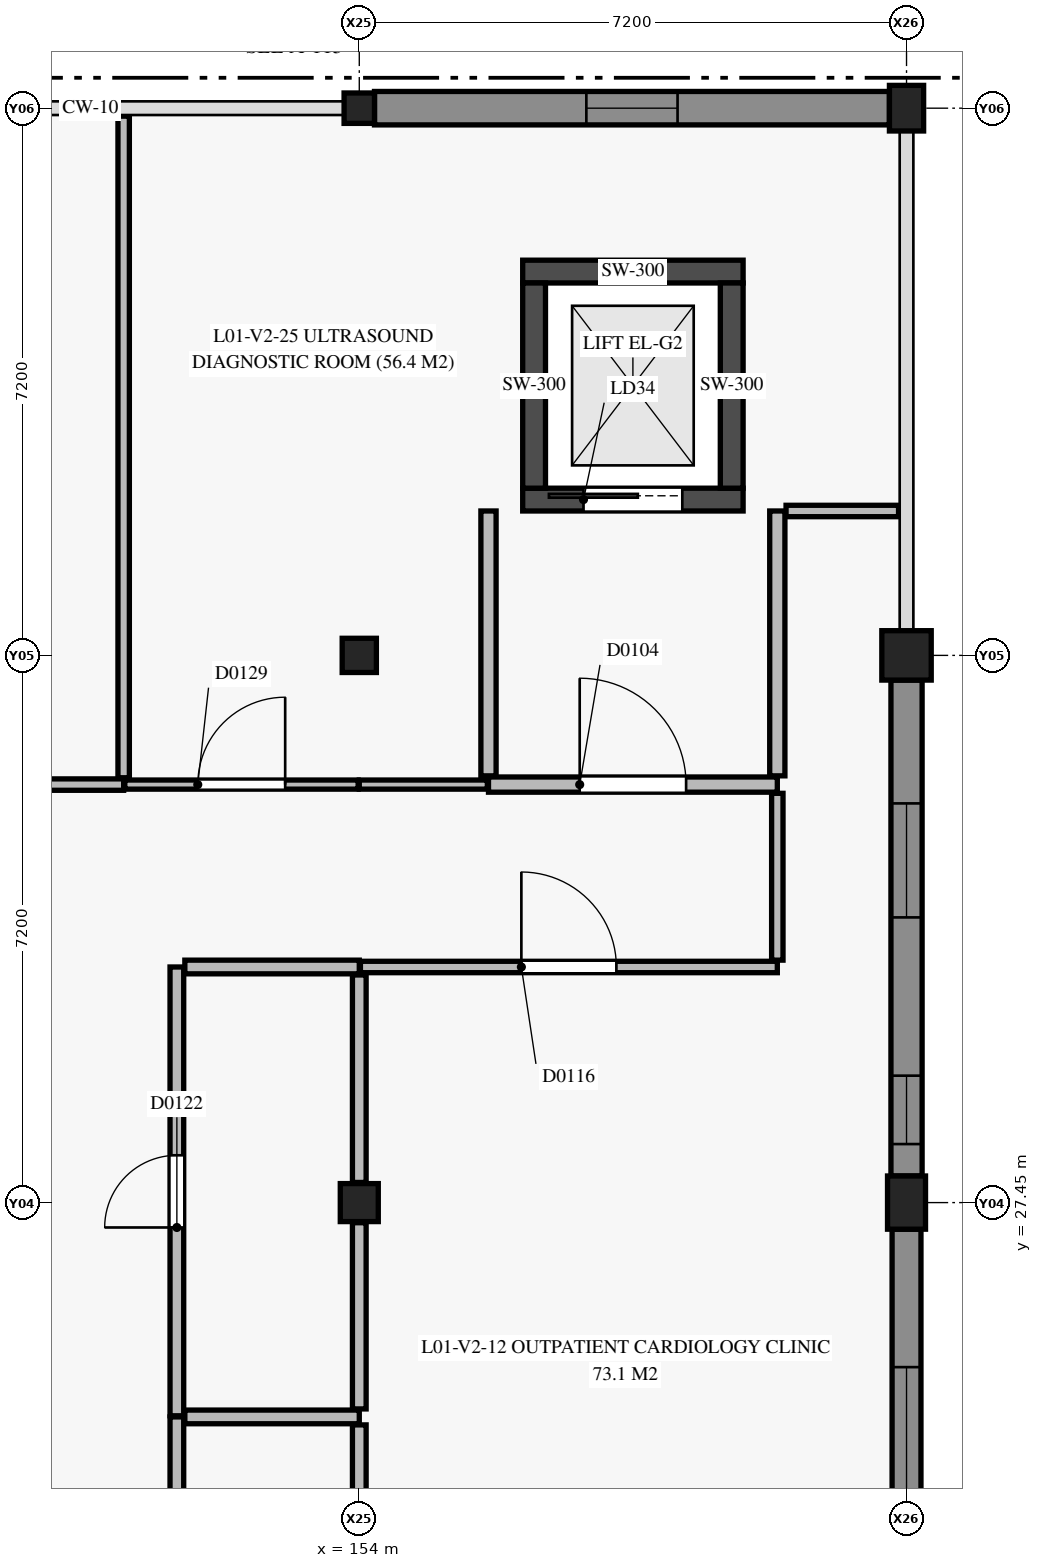
"""IFC4 building model, lengths in metres.
Left out: names, types, materials, properties, quantities, classifications, styles, units other than length and angle.
Written with IfcOpenShell. Run it as: python <this file> out.ifc"""

import sys

from ifc_helpers import new_model, si_unit, direction, frame, frame_2d, origin, origin_2d, place, context, subcontext, project, spatial, rectangle, circle, extrude, element, fill, save


model = new_model("IFC4")
c1 = context("Model", 3, precision=1e-05, world=origin(), true_north=direction((0.0, 1.0)))
c2 = subcontext(c1, "Body", "Model", "MODEL_VIEW")
j1 = project(units=[si_unit("LENGTHUNIT", "METRE"), si_unit("PLANEANGLEUNIT", "RADIAN")], contexts=[c1])
p1 = place(None, origin())
s1 = spatial("IfcSite", under=j1, at=p1, CompositionType="ELEMENT")
p2 = place(p1, origin())
s2 = spatial("IfcBuilding", under=s1, at=p2, CompositionType="ELEMENT")
p3 = place(p2, frame((0.0, 0.0, 4.8)))
s3 = spatial("IfcBuildingStorey", under=s2, at=p3, CompositionType="ELEMENT", Elevation=4.8)
p4 = place(p3, frame((154.0, 27.45, 0.0), z_axis=(0.0, 0.0, 1.0), x_axis=(1.0, 0.0, 0.0)))
e1 = element("IfcColumn", 1, at=p4, inside=s3, PredefinedType="COLUMN", context=c2, shape_type="SweptSolid", body=[
    extrude(rectangle(XDim=0.5, YDim=0.5, at=origin_2d()), origin(), (0.0, 0.0, 1.0), 4.05),
])
p5 = place(p3, frame((154.0, 34.65, 0.0), z_axis=(0.0, 0.0, 1.0), x_axis=(1.0, 0.0, 0.0)))
e2 = element("IfcColumn", 2, at=p5, inside=s3, PredefinedType="COLUMN", context=c2, shape_type="SweptSolid", body=[
    extrude(rectangle(XDim=0.45, YDim=0.45, at=origin_2d()), origin(), (0.0, 0.0, 1.0), 4.05),
])
p6 = place(p3, frame((154.0, 41.85, 0.0), z_axis=(0.0, 0.0, 1.0), x_axis=(1.0, 0.0, 0.0)))
e3 = element("IfcColumn", 3, at=p6, inside=s3, PredefinedType="COLUMN", context=c2, shape_type="SweptSolid", body=[
    extrude(rectangle(XDim=0.4, YDim=0.4, at=origin_2d()), origin(), (0.0, 0.0, 1.0), 4.36),
])
p7 = place(p3, frame((161.2, 27.45, 0.0), z_axis=(0.0, 0.0, 1.0), x_axis=(1.0, 0.0, 0.0)))
e4 = element("IfcColumn", 4, at=p7, inside=s3, PredefinedType="COLUMN", context=c2, shape_type="SweptSolid", body=[
    extrude(rectangle(XDim=0.5, YDim=0.7, at=origin_2d()), origin(), (0.0, 0.0, 1.0), 4.05),
])
p8 = place(p3, frame((161.2, 34.65, 0.0), z_axis=(0.0, 0.0, 1.0), x_axis=(1.0, 0.0, 0.0)))
e5 = element("IfcColumn", 5, at=p8, inside=s3, PredefinedType="COLUMN", context=c2, shape_type="SweptSolid", body=[
    extrude(circle(Radius=0.325, at=origin_2d()), origin(), (0.0, 0.0, 1.0), 4.05),
])
p9 = place(p3, frame((161.2, 41.85, 0.0), z_axis=(0.0, 0.0, 1.0), x_axis=(1.0, 0.0, 0.0)))
e6 = element("IfcColumn", 6, at=p9, inside=s3, PredefinedType="COLUMN", context=c2, shape_type="SweptSolid", body=[
    extrude(rectangle(XDim=0.45, YDim=0.6, at=origin_2d()), origin(), (0.0, 0.0, 1.0), 4.36),
])
p10 = place(p3, frame((156.15, 36.7, 0.0), z_axis=(0.0, 0.0, 1.0), x_axis=(1.0, 0.0, 0.0)))
e7 = element("IfcWall", 7, at=p10, inside=s3, PredefinedType="SHEAR", context=c2, shape_type="SweptSolid", body=[
    extrude(rectangle(XDim=2.9, YDim=0.3, at=frame_2d((1.45, 0.0))), origin(), (0.0, 0.0, 1.0), 3.95),
])
p11 = place(p10, frame((0.8, 0.0, 0.0)))
e8 = element("IfcOpeningElement", 8, at=p11, cuts=e7, PredefinedType="OPENING", context=c2, shape_type="SweptSolid", body=[
    extrude(rectangle(XDim=1.3, YDim=2.15, at=frame_2d((0.65, 1.075))), frame((0.0, 0.16, 0.0), z_axis=(0.0, -1.0, 0.0), x_axis=(1.0, 0.0, 0.0)), (0.0, 0.0, 1.0), 0.32),
])
p12 = place(p3, frame((156.15, 39.7, 0.0), z_axis=(0.0, 0.0, 1.0), x_axis=(1.0, 0.0, 0.0)))
e9 = element("IfcWall", 9, at=p12, inside=s3, PredefinedType="SHEAR", context=c2, shape_type="SweptSolid", body=[
    extrude(rectangle(XDim=2.9, YDim=0.3, at=frame_2d((1.45, 0.0))), origin(), (0.0, 0.0, 1.0), 3.95),
])
for number, where, z_axis, x_axis in (
    (10, (156.3, 36.85, 0.0), (0.0, 0.0, 1.0), (0.0, 1.0, 0.0)),
    (11, (158.9, 36.85, 0.0), (0.0, 0.0, 1.0), (0.0, 1.0, 0.0)),
):
    element("IfcWall", number, at=place(p3, frame(where, z_axis=z_axis, x_axis=x_axis)), inside=s3, PredefinedType="SHEAR", context=c2, shape_type="SweptSolid", body=[
        extrude(rectangle(XDim=2.7, YDim=0.3, at=frame_2d((1.35, 0.0))), origin(), (0.0, 0.0, 1.0), 3.95),
    ])
p13 = place(p3, frame((154.2, 41.85, 0.0), z_axis=(0.0, 0.0, 1.0), x_axis=(1.0, 0.0, 0.0)))
e12 = element("IfcWall", 12, at=p13, inside=s3, PredefinedType="USERDEFINED", context=c2, shape_type="SweptSolid", body=[
    extrude(rectangle(XDim=6.775, YDim=0.44, at=frame_2d((3.388, 0.0))), origin(), (0.0, 0.0, 1.0), 3.38),
])
p14 = place(p13, frame((2.788, 0.0, 0.9)))
e13 = element("IfcOpeningElement", 13, at=p14, cuts=e12, PredefinedType="OPENING", context=c2, shape_type="SweptSolid", body=[
    extrude(rectangle(XDim=1.2, YDim=1.5, at=frame_2d((0.6, 0.75))), frame((0.0, 0.23, 0.0), z_axis=(0.0, -1.0, 0.0), x_axis=(1.0, 0.0, 0.0)), (0.0, 0.0, 1.0), 0.46),
])
p15 = place(p3, frame((161.2, 34.325, 0.0), z_axis=(0.0, 0.0, 1.0), x_axis=(0.0, -1.0, 0.0)))
e14 = element("IfcWall", 14, at=p15, inside=s3, PredefinedType="USERDEFINED", context=c2, shape_type="SweptSolid", body=[
    extrude(rectangle(XDim=6.525, YDim=0.41, at=frame_2d((3.262, 0.0))), origin(), (0.0, 0.0, 1.0), 3.38),
])
p16 = place(p15, frame((1.623, 0.0, 0.9)))
e15 = element("IfcOpeningElement", 15, at=p16, cuts=e14, PredefinedType="OPENING", context=c2, shape_type="SweptSolid", body=[
    extrude(rectangle(XDim=1.5, YDim=1.5, at=frame_2d((0.75, 0.75))), frame((0.0, 0.215, 0.0), z_axis=(0.0, -1.0, 0.0), x_axis=(1.0, 0.0, 0.0)), (0.0, 0.0, 1.0), 0.43),
])
p17 = place(p15, frame((5.205, 0.0, 0.95)))
e16 = element("IfcOpeningElement", 16, at=p17, cuts=e14, PredefinedType="OPENING", context=c2, shape_type="SweptSolid", body=[
    extrude(rectangle(XDim=0.9, YDim=1.2, at=frame_2d((0.45, 0.6))), frame((0.0, 0.215, 0.0), z_axis=(0.0, -1.0, 0.0), x_axis=(1.0, 0.0, 0.0)), (0.0, 0.0, 1.0), 0.43),
])
p18 = place(p3, frame((161.2, 27.1, 0.0), z_axis=(0.0, 0.0, 1.0), x_axis=(0.0, -1.0, 0.0)))
e17 = element("IfcWall", 17, at=p18, inside=s3, PredefinedType="USERDEFINED", context=c2, shape_type="SweptSolid", body=[
    extrude(rectangle(XDim=6.4, YDim=0.38, at=frame_2d((3.2, 0.0))), origin(), (0.0, 0.0, 1.0), 3.38),
])
p19 = place(p18, frame((1.815, 0.0, 0.9)))
e18 = element("IfcOpeningElement", 18, at=p19, cuts=e17, PredefinedType="OPENING", context=c2, shape_type="SweptSolid", body=[
    extrude(rectangle(XDim=2.4, YDim=1.5, at=frame_2d((1.2, 0.75))), frame((0.0, 0.2, 0.0), z_axis=(0.0, -1.0, 0.0), x_axis=(1.0, 0.0, 0.0)), (0.0, 0.0, 1.0), 0.4),
])
p20 = place(p3, frame((155.7, 32.95, 0.0), z_axis=(0.0, 0.0, 1.0), x_axis=(1.0, 0.0, 0.0)))
e19 = element("IfcWall", 19, at=p20, inside=s3, PredefinedType="PARTITIONING", context=c2, shape_type="SweptSolid", body=[
    extrude(rectangle(XDim=3.8, YDim=0.2, at=frame_2d((1.9, 0.0))), origin(), (0.0, 0.0, 1.0), 3.95),
])
p21 = place(p20, frame((1.2, 0.0, 0.0)))
e20 = element("IfcOpeningElement", 20, at=p21, cuts=e19, PredefinedType="OPENING", context=c2, shape_type="SweptSolid", body=[
    extrude(rectangle(XDim=1.4, YDim=2.2, at=frame_2d((0.7, 1.1))), frame((0.0, 0.11, 0.0), z_axis=(0.0, -1.0, 0.0), x_axis=(1.0, 0.0, 0.0)), (0.0, 0.0, 1.0), 0.22),
])
for number, where, z_axis, x_axis in (
    (21, (159.5, 33.065, 0.0), (0.0, 0.0, 1.0), (0.0, 1.0, 0.0)),
    (22, (155.7, 33.065, 0.0), (0.0, 0.0, 1.0), (0.0, 1.0, 0.0)),
):
    element("IfcWall", number, at=place(p3, frame(where, z_axis=z_axis, x_axis=x_axis)), inside=s3, PredefinedType="PARTITIONING", context=c2, shape_type="SweptSolid", body=[
        extrude(rectangle(XDim=3.485, YDim=0.2, at=frame_2d((1.743, 0.0))), origin(), (0.0, 0.0, 1.0), 3.47),
    ])
p22 = place(p3, frame((151.6, 18.115, 0.0), z_axis=(0.0, 0.0, 1.0), x_axis=(0.0, 1.0, 0.0)))
e23 = element("IfcWall", 23, at=p22, inside=s3, PredefinedType="PLUMBINGWALL", context=c2, shape_type="SweptSolid", body=[
    extrude(rectangle(XDim=6.515, YDim=0.18, at=frame_2d((3.257, 0.0))), origin(), (0.0, 0.0, 1.0), 3.37),
])
p23 = place(p22, frame((2.782, 0.0, 0.0)))
e24 = element("IfcOpeningElement", 24, at=p23, cuts=e23, PredefinedType="OPENING", context=c2, shape_type="SweptSolid", body=[
    extrude(rectangle(XDim=0.95, YDim=2.1, at=frame_2d((0.475, 1.05))), frame((0.0, 0.1, 0.0), z_axis=(0.0, -1.0, 0.0), x_axis=(1.0, 0.0, 0.0)), (0.0, 0.0, 1.0), 0.2),
])
p24 = place(p3, frame((151.6, 24.645, 0.0), z_axis=(0.0, 0.0, 1.0), x_axis=(0.0, 1.0, 0.0)))
e25 = element("IfcWall", 25, at=p24, inside=s3, PredefinedType="PLUMBINGWALL", context=c2, shape_type="SweptSolid", body=[
    extrude(rectangle(XDim=5.905, YDim=0.18, at=frame_2d((2.953, 0.0))), origin(), (0.0, 0.0, 1.0), 3.22),
])
p25 = place(p24, frame((2.478, 0.0, 0.0)))
e26 = element("IfcOpeningElement", 26, at=p25, cuts=e25, PredefinedType="OPENING", context=c2, shape_type="SweptSolid", body=[
    extrude(rectangle(XDim=0.95, YDim=2.1, at=frame_2d((0.475, 1.05))), frame((0.0, 0.1, 0.0), z_axis=(0.0, -1.0, 0.0), x_axis=(1.0, 0.0, 0.0)), (0.0, 0.0, 1.0), 0.2),
])
p26 = place(p3, frame((151.705, 30.55, 0.0), z_axis=(0.0, 0.0, 1.0), x_axis=(1.0, 0.0, 0.0)))
e27 = element("IfcWall", 27, at=p26, inside=s3, PredefinedType="PLUMBINGWALL", context=c2, shape_type="SweptSolid", body=[
    extrude(rectangle(XDim=2.295, YDim=0.18, at=frame_2d((1.147, 0.0))), origin(), (0.0, 0.0, 1.0), 3.95),
])
p27 = place(p3, frame((154.015, 30.55, 0.0), z_axis=(0.0, 0.0, 1.0), x_axis=(1.0, 0.0, 0.0)))
e28 = element("IfcWall", 28, at=p27, inside=s3, PredefinedType="PARTITIONING", context=c2, shape_type="SweptSolid", body=[
    extrude(rectangle(XDim=5.485, YDim=0.15, at=frame_2d((2.743, 0.0))), origin(), (0.0, 0.0, 1.0), 3.95),
])
p28 = place(p27, frame((2.117, 0.0, 0.0)))
e29 = element("IfcOpeningElement", 29, at=p28, cuts=e28, PredefinedType="OPENING", context=c2, shape_type="SweptSolid", body=[
    extrude(rectangle(XDim=1.25, YDim=2.15, at=frame_2d((0.625, 1.075))), frame((0.0, 0.085, 0.0), z_axis=(0.0, -1.0, 0.0), x_axis=(1.0, 0.0, 0.0)), (0.0, 0.0, 1.0), 0.17),
])
p29 = place(p3, frame((159.5, 30.64, 0.0), z_axis=(0.0, 0.0, 1.0), x_axis=(0.0, 1.0, 0.0)))
e30 = element("IfcWall", 30, at=p29, inside=s3, PredefinedType="PARTITIONING", context=c2, shape_type="SweptSolid", body=[
    extrude(rectangle(XDim=2.195, YDim=0.15, at=frame_2d((1.098, 0.0))), origin(), (0.0, 0.0, 1.0), 3.95),
])
p30 = place(p3, frame((146.8, 32.95, 0.0), z_axis=(0.0, 0.0, 1.0), x_axis=(1.0, 0.0, 0.0)))
e31 = element("IfcWall", 31, at=p30, inside=s3, PredefinedType="PARTITIONING", context=c2, shape_type="SweptSolid", body=[
    extrude(rectangle(XDim=4.1, YDim=0.15, at=frame_2d((2.05, 0.0))), origin(), (0.0, 0.0, 1.0), 3.95),
])
p31 = place(p30, frame((1.425, 0.0, 0.0)))
e32 = element("IfcOpeningElement", 32, at=p31, cuts=e31, PredefinedType="OPENING", context=c2, shape_type="SweptSolid", body=[
    extrude(rectangle(XDim=1.25, YDim=2.15, at=frame_2d((0.625, 1.075))), frame((0.0, 0.085, 0.0), z_axis=(0.0, -1.0, 0.0), x_axis=(1.0, 0.0, 0.0)), (0.0, 0.0, 1.0), 0.17),
])
p32 = place(p3, frame((154.0, 32.95, 0.0), z_axis=(0.0, 0.0, 1.0), x_axis=(1.0, 0.0, 0.0)))
e33 = element("IfcWall", 33, at=p32, inside=s3, PredefinedType="PARTITIONING", context=c2, shape_type="SweptSolid", body=[
    extrude(rectangle(XDim=1.685, YDim=0.12, at=frame_2d((0.843, 0.0))), origin(), (0.0, 0.0, 1.0), 3.95),
])
p33 = place(p3, frame((150.915, 32.95, 0.0), z_axis=(0.0, 0.0, 1.0), x_axis=(1.0, 0.0, 0.0)))
e34 = element("IfcWall", 34, at=p33, inside=s3, PredefinedType="PARTITIONING", context=c2, shape_type="SweptSolid", body=[
    extrude(rectangle(XDim=3.07, YDim=0.12, at=frame_2d((1.535, 0.0))), origin(), (0.0, 0.0, 1.0), 3.95),
])
p34 = place(p33, frame((0.96, 0.0, 0.0)))
e35 = element("IfcOpeningElement", 35, at=p34, cuts=e34, PredefinedType="OPENING", context=c2, shape_type="SweptSolid", body=[
    extrude(rectangle(XDim=1.15, YDim=2.15, at=frame_2d((0.575, 1.075))), frame((0.0, 0.07, 0.0), z_axis=(0.0, -1.0, 0.0), x_axis=(1.0, 0.0, 0.0)), (0.0, 0.0, 1.0), 0.14),
])
p35 = place(p3, frame((151.705, 24.63, 0.0), z_axis=(0.0, 0.0, 1.0), x_axis=(1.0, 0.0, 0.0)))
e36 = element("IfcWall", 36, at=p35, inside=s3, PredefinedType="PLUMBINGWALL", context=c2, shape_type="SweptSolid", body=[
    extrude(rectangle(XDim=2.295, YDim=0.18, at=frame_2d((1.147, 0.0))), origin(), (0.0, 0.0, 1.0), 3.95),
])
p36 = place(p3, frame((154.0, 20.9, 0.0), z_axis=(0.0, 0.0, 1.0), x_axis=(0.0, 1.0, 0.0)))
e37 = element("IfcWall", 37, at=p36, inside=s3, PredefinedType="PLUMBINGWALL", context=c2, shape_type="SweptSolid", body=[
    extrude(rectangle(XDim=3.625, YDim=0.18, at=frame_2d((1.812, 0.0))), origin(), (0.0, 0.0, 1.0), 3.95),
])
p37 = place(p3, frame((154.0, 24.735, 0.0), z_axis=(0.0, 0.0, 1.0), x_axis=(0.0, 1.0, 0.0)))
e38 = element("IfcWall", 38, at=p37, inside=s3, PredefinedType="PLUMBINGWALL", context=c2, shape_type="SweptSolid", body=[
    extrude(rectangle(XDim=2.45, YDim=0.18, at=frame_2d((1.225, 0.0))), origin(), (0.0, 0.0, 1.0), 3.95),
])
p38 = place(p3, frame((154.0, 27.715, 0.0), z_axis=(0.0, 0.0, 1.0), x_axis=(0.0, 1.0, 0.0)))
e39 = element("IfcWall", 39, at=p38, inside=s3, PredefinedType="PLUMBINGWALL", context=c2, shape_type="SweptSolid", body=[
    extrude(rectangle(XDim=2.73, YDim=0.18, at=frame_2d((1.365, 0.0))), origin(), (0.0, 0.0, 1.0), 3.95),
])
p39 = place(p3, frame((159.615, 36.55, 0.0), z_axis=(0.0, 0.0, 1.0), x_axis=(1.0, 0.0, 0.0)))
e40 = element("IfcWall", 40, at=p39, inside=s3, PredefinedType="PARTITIONING", context=c2, shape_type="SweptSolid", body=[
    extrude(rectangle(XDim=1.48, YDim=0.15, at=frame_2d((0.74, 0.0))), origin(), (0.0, 0.0, 1.0), 3.95),
])
p40 = place(p3, frame((150.9, 33.04, 0.0), z_axis=(0.0, 0.0, 1.0), x_axis=(0.0, 1.0, 0.0)))
e41 = element("IfcWall", 41, at=p40, inside=s3, PredefinedType="PARTITIONING", context=c2, shape_type="SweptSolid", body=[
    extrude(rectangle(XDim=8.705, YDim=0.15, at=frame_2d((4.353, 0.0))), origin(), (0.0, 0.0, 1.0), 3.44),
])
p41 = place(p14, origin())
e42 = element("IfcWindow", 42, at=p41, inside=s3, PartitioningType="SINGLE_PANEL", PredefinedType="WINDOW", context=c2, shape_type="SweptSolid", body=[
    extrude(rectangle(XDim=1.2, YDim=1.5, at=frame_2d((0.6, 0.75))), frame((0.0, 0.03, 0.0), z_axis=(0.0, -1.0, 0.0), x_axis=(1.0, 0.0, 0.0)), (0.0, 0.0, 1.0), 0.06),
])
fill(e13, e42)
p42 = place(p16, origin())
e43 = element("IfcWindow", 43, at=p42, inside=s3, PartitioningType="SINGLE_PANEL", PredefinedType="WINDOW", context=c2, shape_type="SweptSolid", body=[
    extrude(rectangle(XDim=1.5, YDim=1.5, at=frame_2d((0.75, 0.75))), frame((0.0, 0.03, 0.0), z_axis=(0.0, -1.0, 0.0), x_axis=(1.0, 0.0, 0.0)), (0.0, 0.0, 1.0), 0.06),
])
fill(e15, e43)
p43 = place(p17, origin())
e44 = element("IfcWindow", 44, at=p43, inside=s3, PartitioningType="SINGLE_PANEL", PredefinedType="WINDOW", context=c2, shape_type="SweptSolid", body=[
    extrude(rectangle(XDim=0.9, YDim=1.2, at=frame_2d((0.45, 0.6))), frame((0.0, 0.03, 0.0), z_axis=(0.0, -1.0, 0.0), x_axis=(1.0, 0.0, 0.0)), (0.0, 0.0, 1.0), 0.06),
])
fill(e16, e44)
p44 = place(p19, origin())
e45 = element("IfcWindow", 45, at=p44, inside=s3, PartitioningType="SINGLE_PANEL", PredefinedType="WINDOW", context=c2, shape_type="SweptSolid", body=[
    extrude(rectangle(XDim=2.4, YDim=1.5, at=frame_2d((1.2, 0.75))), frame((0.0, 0.03, 0.0), z_axis=(0.0, -1.0, 0.0), x_axis=(1.0, 0.0, 0.0)), (0.0, 0.0, 1.0), 0.06),
])
fill(e18, e45)
p45 = place(p11, origin())
e46 = element("IfcDoor", 46, at=p45, inside=s3, OperationType="SLIDING_TO_LEFT", PredefinedType="DOOR", context=c2, shape_type="SweptSolid", body=[
    extrude(rectangle(XDim=1.3, YDim=2.15, at=frame_2d((0.65, 1.075))), frame((0.0, 0.025, 0.0), z_axis=(0.0, -1.0, 0.0), x_axis=(1.0, 0.0, 0.0)), (0.0, 0.0, 1.0), 0.05),
])
fill(e8, e46)
p46 = place(p21, origin())
e47 = element("IfcDoor", 47, at=p46, inside=s3, OperationType="SINGLE_SWING_LEFT", PredefinedType="DOOR", context=c2, shape_type="SweptSolid", body=[
    extrude(rectangle(XDim=1.4, YDim=2.2, at=frame_2d((0.7, 1.1))), frame((0.0, 0.025, 0.0), z_axis=(0.0, -1.0, 0.0), x_axis=(1.0, 0.0, 0.0)), (0.0, 0.0, 1.0), 0.05),
])
fill(e20, e47)
p47 = place(p28, origin())
e48 = element("IfcDoor", 48, at=p47, inside=s3, OperationType="SINGLE_SWING_LEFT", PredefinedType="DOOR", context=c2, shape_type="SweptSolid", body=[
    extrude(rectangle(XDim=1.25, YDim=2.15, at=frame_2d((0.625, 1.075))), frame((0.0, 0.025, 0.0), z_axis=(0.0, -1.0, 0.0), x_axis=(1.0, 0.0, 0.0)), (0.0, 0.0, 1.0), 0.05),
])
fill(e29, e48)
p48 = place(p25, origin())
e49 = element("IfcDoor", 49, at=p48, inside=s3, OperationType="SINGLE_SWING_LEFT", PredefinedType="DOOR", context=c2, shape_type="SweptSolid", body=[
    extrude(rectangle(XDim=0.95, YDim=2.1, at=frame_2d((0.475, 1.05))), frame((0.0, 0.025, 0.0), z_axis=(0.0, -1.0, 0.0), x_axis=(1.0, 0.0, 0.0)), (0.0, 0.0, 1.0), 0.05),
])
fill(e26, e49)
p49 = place(p34, origin())
e50 = element("IfcDoor", 50, at=p49, inside=s3, OperationType="SINGLE_SWING_RIGHT", PredefinedType="DOOR", context=c2, shape_type="SweptSolid", body=[
    extrude(rectangle(XDim=1.15, YDim=2.15, at=frame_2d((0.575, 1.075))), frame((0.0, 0.025, 0.0), z_axis=(0.0, -1.0, 0.0), x_axis=(1.0, 0.0, 0.0)), (0.0, 0.0, 1.0), 0.05),
])
fill(e35, e50)
save(model, sys.argv[1])
